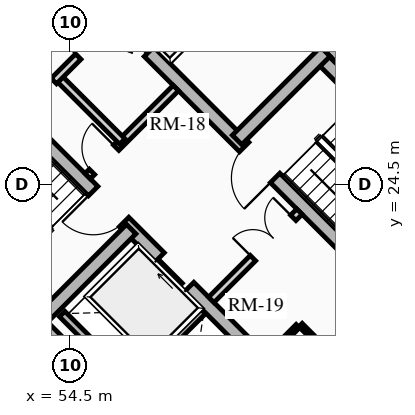
"""IFC4 building model, lengths in metres.
Left out: names, types, materials, properties, quantities, classifications, styles, units other than length and angle.
Written with IfcOpenShell. Run it as: python <this file> out.ifc"""

import sys

from ifc_helpers import new_model, si_unit, direction, frame, frame_2d, origin, place, context, subcontext, project, spatial, rectangle, extrude, source, transform, mapped, element, fill, save


model = new_model("IFC4")
c1 = context("Model", 3, precision=1e-05, world=origin(), true_north=direction((0.0, 1.0)))
c2 = subcontext(c1, "Body", "Model", "MODEL_VIEW")
j1 = project(units=[si_unit("LENGTHUNIT", "METRE"), si_unit("PLANEANGLEUNIT", "RADIAN")], contexts=[c1])
p1 = place(None, origin())
s1 = spatial("IfcSite", under=j1, at=p1, CompositionType="ELEMENT")
p2 = place(p1, origin())
s2 = spatial("IfcBuilding", under=s1, at=p2, CompositionType="ELEMENT")
p3 = place(p2, frame((0.0, 0.0, 24.91)))
s3 = spatial("IfcBuildingStorey", under=s2, at=p3, CompositionType="ELEMENT", Elevation=24.91)
for number, where, z_axis, x_axis in (
    (1, (58.773, 15.661, 0.0), (0.0, 0.0, 1.0), (-0.707, 0.707, 0.0)),
    (2, (66.339, 23.227, 0.0), (0.0, 0.0, 1.0), (-0.707, 0.707, 0.0)),
):
    element("IfcWall", number, at=place(p3, frame(where, z_axis=z_axis, x_axis=x_axis)), inside=s3, PredefinedType="SHEAR", context=c2, shape_type="SweptSolid", body=[
        extrude(rectangle(XDim=14.3, YDim=0.5, at=frame_2d((7.15, 0.0))), origin(), (0.0, 0.0, 1.0), 2.91),
    ])
p4 = place(p3, frame((58.596, 15.838, 0.0), z_axis=(0.0, 0.0, 1.0), x_axis=(0.707106781187, 0.707106781187, 0.0)))
e3 = element("IfcWall", 3, at=p4, inside=s3, PredefinedType="SHEAR", context=c2, shape_type="SweptSolid", body=[
    extrude(rectangle(XDim=10.7, YDim=0.5, at=frame_2d((5.35, 0.0))), origin(), (0.0, 0.0, 1.0), 2.91),
])
m1 = source(origin(), c2, "Body", "SweptSolid", [
    extrude(rectangle(XDim=1.5, YDim=2.02, at=frame_2d((0.75, 1.01))), frame((0.0, 0.26, 0.0), z_axis=(0.0, -1.0, 0.0), x_axis=(1.0, 0.0, 0.0)), (0.0, 0.0, 1.0), 0.52),
])
p5 = place(p4, frame((5.45, 0.0, 0.0)))
e4 = element("IfcOpeningElement", 4, at=p5, cuts=e3, PredefinedType="OPENING", context=c2, shape_type="MappedRepresentation", body=[
    mapped(m1, transform((0.0, 0.0, 0.0), x_axis=(1.0, 0.0, 0.0), y_axis=(0.0, 1.0, 0.0), z_axis=(0.0, 0.0, 1.0), scale=1.0)),
])
p6 = place(p3, frame((48.838, 25.596, 0.0), z_axis=(0.0, 0.0, 1.0), x_axis=(0.707106781187, 0.707106781187, 0.0)))
e5 = element("IfcWall", 5, at=p6, inside=s3, PredefinedType="SHEAR", context=c2, shape_type="SweptSolid", body=[
    extrude(rectangle(XDim=10.7, YDim=0.5, at=frame_2d((5.35, 0.0))), origin(), (0.0, 0.0, 1.0), 2.91),
])
p7 = place(p6, frame((4.6, 0.0, 0.0)))
e6 = element("IfcOpeningElement", 6, at=p7, cuts=e5, PredefinedType="OPENING", context=c2, shape_type="MappedRepresentation", body=[
    mapped(m1, transform((0.0, 0.0, 0.0), x_axis=(1.0, 0.0, 0.0), y_axis=(0.0, 1.0, 0.0), z_axis=(0.0, 0.0, 1.0), scale=1.0)),
])
p8 = place(p3, frame((61.096, 18.338, 0.0), z_axis=(0.0, 0.0, 1.0), x_axis=(-0.707106781187, 0.707106781187, 0.0)))
e7 = element("IfcWall", 7, at=p8, inside=s3, PredefinedType="SHEAR", context=c2, shape_type="SweptSolid", body=[
    extrude(rectangle(XDim=13.8, YDim=0.35, at=frame_2d((6.9, 0.0))), origin(), (0.0, 0.0, 1.0), 2.91),
])
m2 = source(origin(), c2, "Body", "SweptSolid", [
    extrude(rectangle(XDim=1.1, YDim=2.015, at=frame_2d((0.55, 1.007))), frame((0.0, 0.185, 0.0), z_axis=(0.0, -1.0, 0.0), x_axis=(1.0, 0.0, 0.0)), (0.0, 0.0, 1.0), 0.37),
])
p9 = place(p8, frame((4.9, 0.0, 0.0)))
e8 = element("IfcOpeningElement", 8, at=p9, cuts=e7, PredefinedType="OPENING", context=c2, shape_type="MappedRepresentation", body=[
    mapped(m2, transform((0.0, 0.0, 0.0), x_axis=(1.0, 0.0, 0.0), y_axis=(0.0, 1.0, 0.0), z_axis=(0.0, 0.0, 1.0), scale=1.0)),
])
m3 = source(origin(), c2, "Body", "SweptSolid", [
    extrude(rectangle(XDim=1.15, YDim=2.02, at=frame_2d((0.575, 1.01))), frame((0.0, 0.185, 0.0), z_axis=(0.0, -1.0, 0.0), x_axis=(1.0, 0.0, 0.0)), (0.0, 0.0, 1.0), 0.37),
])
p10 = place(p8, frame((7.32, 0.0, 0.0)))
e9 = element("IfcOpeningElement", 9, at=p10, cuts=e7, PredefinedType="OPENING", context=c2, shape_type="MappedRepresentation", body=[
    mapped(m3, transform((0.0, 0.0, 0.0), x_axis=(1.0, 0.0, 0.0), y_axis=(0.0, 1.0, 0.0), z_axis=(0.0, 0.0, 1.0), scale=1.0)),
])
p11 = place(p3, frame((63.662, 20.904, 0.0), z_axis=(0.0, 0.0, 1.0), x_axis=(-0.707106781187, 0.707106781187, 0.0)))
e10 = element("IfcWall", 10, at=p11, inside=s3, PredefinedType="SHEAR", context=c2, shape_type="SweptSolid", body=[
    extrude(rectangle(XDim=13.8, YDim=0.35, at=frame_2d((6.9, 0.0))), origin(), (0.0, 0.0, 1.0), 2.91),
])
p12 = place(p11, frame((10.025, 0.0, 0.0)))
e11 = element("IfcOpeningElement", 11, at=p12, cuts=e10, PredefinedType="OPENING", context=c2, shape_type="MappedRepresentation", body=[
    mapped(m2, transform((0.0, 0.0, 0.0), x_axis=(1.0, 0.0, 0.0), y_axis=(0.0, 1.0, 0.0), z_axis=(0.0, 0.0, 1.0), scale=1.0)),
])
p13 = place(p11, frame((12.025, 0.0, 0.0)))
e12 = element("IfcOpeningElement", 12, at=p13, cuts=e10, PredefinedType="OPENING", context=c2, shape_type="MappedRepresentation", body=[
    mapped(m2, transform((0.0, 0.0, 0.0), x_axis=(1.0, 0.0, 0.0), y_axis=(0.0, 1.0, 0.0), z_axis=(0.0, 0.0, 1.0), scale=1.0)),
])
p14 = place(p11, frame((5.33, 0.0, 0.0)))
e13 = element("IfcOpeningElement", 13, at=p14, cuts=e10, PredefinedType="OPENING", context=c2, shape_type="MappedRepresentation", body=[
    mapped(m3, transform((0.0, 0.0, 0.0), x_axis=(1.0, 0.0, 0.0), y_axis=(0.0, 1.0, 0.0), z_axis=(0.0, 0.0, 1.0), scale=1.0)),
])
p15 = place(p3, frame((53.922, 21.141, 0.0), z_axis=(0.0, 0.0, 1.0), x_axis=(-0.707106781187, 0.707106781187, 0.0)))
e14 = element("IfcWall", 14, at=p15, inside=s3, PredefinedType="SHEAR", context=c2, shape_type="SweptSolid", body=[
    extrude(rectangle(XDim=6.745, YDim=0.35, at=frame_2d((3.373, 0.0))), origin(), (0.0, 0.0, 1.0), 2.91),
])
p16 = place(p3, frame((53.784, 21.003, 0.0), z_axis=(0.0, 0.0, 1.0), x_axis=(0.707106781187, 0.707106781187, 0.0)))
e15 = element("IfcWall", 15, at=p16, inside=s3, PredefinedType="SHEAR", context=c2, shape_type="SweptSolid", body=[
    extrude(rectangle(XDim=3.285, YDim=0.35, at=frame_2d((1.643, 0.0))), origin(), (0.0, 0.0, 1.0), 2.91),
])
p17 = place(p3, frame((65.847, 23.089, 0.0), z_axis=(0.0, 0.0, 1.0), x_axis=(-0.707106781187, 0.707106781187, 0.0)))
e16 = element("IfcWall", 16, at=p17, inside=s3, PredefinedType="SHEAR", context=c2, shape_type="SweptSolid", body=[
    extrude(rectangle(XDim=6.745, YDim=0.35, at=frame_2d((3.373, 0.0))), origin(), (0.0, 0.0, 1.0), 2.91),
])
p18 = place(p3, frame((58.893, 25.674, 0.0), z_axis=(0.0, 0.0, 1.0), x_axis=(0.707106781187, 0.707106781187, 0.0)))
e17 = element("IfcWall", 17, at=p18, inside=s3, PredefinedType="SHEAR", context=c2, shape_type="SweptSolid", body=[
    extrude(rectangle(XDim=3.285, YDim=0.35, at=frame_2d((1.643, 0.0))), origin(), (0.0, 0.0, 1.0), 2.91),
])
p19 = place(p3, frame((55.888, 19.069, 0.0), z_axis=(0.0, 0.0, 1.0), x_axis=(0.707106781187, 0.707106781187, 0.0)))
e18 = element("IfcWall", 18, at=p19, inside=s3, PredefinedType="SHEAR", context=c2, shape_type="SweptSolid", body=[
    extrude(rectangle(XDim=2.97, YDim=0.2, at=frame_2d((1.485, 0.0))), origin(), (0.0, 0.0, 1.0), 2.91),
])
p20 = place(p3, frame((56.015, 19.366, 0.0), z_axis=(0.0, 0.0, 1.0), x_axis=(-0.707106781187, 0.707106781187, 0.0)))
e19 = element("IfcWall", 19, at=p20, inside=s3, PredefinedType="SHEAR", context=c2, shape_type="SweptSolid", body=[
    extrude(rectangle(XDim=2.44, YDim=0.2, at=frame_2d((1.22, 0.0))), origin(), (0.0, 0.0, 1.0), 2.91),
])
p21 = place(p3, frame((57.062, 27.781, 0.0), z_axis=(0.0, 0.0, 1.0), x_axis=(0.707106781187, 0.707106781187, 0.0)))
e20 = element("IfcWall", 20, at=p21, inside=s3, PredefinedType="SHEAR", context=c2, shape_type="SweptSolid", body=[
    extrude(rectangle(XDim=2.97, YDim=0.2, at=frame_2d((1.485, 0.0))), origin(), (0.0, 0.0, 1.0), 2.91),
])
p22 = place(p3, frame((58.214, 21.467, 0.0), z_axis=(0.0, 0.0, 1.0), x_axis=(0.707106781187, 0.707106781187, 0.0)))
e21 = element("IfcWall", 21, at=p22, inside=s3, PredefinedType="PARTITIONING", context=c2, shape_type="SweptSolid", body=[
    extrude(rectangle(XDim=3.28, YDim=0.2, at=frame_2d((1.64, 0.0))), origin(), (0.0, 0.0, 1.0), 2.635),
])
m4 = source(origin(), c2, "Body", "SweptSolid", [
    extrude(rectangle(XDim=1.5, YDim=2.02, at=frame_2d((0.75, 1.01))), frame((0.0, 0.11, 0.0), z_axis=(0.0, -1.0, 0.0), x_axis=(1.0, 0.0, 0.0)), (0.0, 0.0, 1.0), 0.22),
])
p23 = place(p22, frame((1.55, 0.0, 0.0)))
e22 = element("IfcOpeningElement", 22, at=p23, cuts=e21, PredefinedType="OPENING", context=c2, shape_type="MappedRepresentation", body=[
    mapped(m4, transform((0.0, 0.0, 0.0), x_axis=(1.0, 0.0, 0.0), y_axis=(0.0, 1.0, 0.0), z_axis=(0.0, 0.0, 1.0), scale=1.0)),
])
p24 = place(p3, frame((54.961, 24.719, 0.0), z_axis=(0.0, 0.0, 1.0), x_axis=(0.707106781187, 0.707106781187, 0.0)))
e23 = element("IfcWall", 23, at=p24, inside=s3, PredefinedType="PARTITIONING", context=c2, shape_type="SweptSolid", body=[
    extrude(rectangle(XDim=3.28, YDim=0.2, at=frame_2d((1.64, 0.0))), origin(), (0.0, 0.0, 1.0), 2.635),
])
m5 = source(origin(), c2, "Body", "SweptSolid", [
    extrude(rectangle(XDim=0.9, YDim=2.005, at=frame_2d((0.45, 1.002))), frame((0.0, 0.11, 0.0), z_axis=(0.0, -1.0, 0.0), x_axis=(1.0, 0.0, 0.0)), (0.0, 0.0, 1.0), 0.22),
])
p25 = place(p24, frame((0.16, 0.0, 0.0)))
e24 = element("IfcOpeningElement", 24, at=p25, cuts=e23, PredefinedType="OPENING", context=c2, shape_type="MappedRepresentation", body=[
    mapped(m5, transform((0.0, 0.0, 0.0), x_axis=(1.0, 0.0, 0.0), y_axis=(0.0, 1.0, 0.0), z_axis=(0.0, 0.0, 1.0), scale=1.0)),
])
p26 = place(p3, frame((55.874, 25.631, 0.0), z_axis=(0.0, 0.0, 1.0), x_axis=(-0.707157639372, 0.707055919343, 0.0)))
e25 = element("IfcWall", 25, at=p26, inside=s3, PredefinedType="PARTITIONING", context=c2, shape_type="SweptSolid", body=[
    extrude(rectangle(XDim=2.4, YDim=0.2, at=frame_2d((1.2, 0.0))), origin(), (0.0, 0.0, 1.0), 2.635),
])
p27 = place(p3, frame((53.264, 26.416, 0.0), z_axis=(0.0, 0.0, 1.0), x_axis=(0.707106781187, 0.707106781187, 0.0)))
e26 = element("IfcWall", 26, at=p27, inside=s3, PredefinedType="PARTITIONING", context=c2, shape_type="SweptSolid", body=[
    extrude(rectangle(XDim=3.28, YDim=0.2, at=frame_2d((1.64, 0.0))), origin(), (0.0, 0.0, 1.0), 2.635),
])
m6 = source(origin(), c2, "Body", "SweptSolid", [
    extrude(rectangle(XDim=1.0, YDim=2.015, at=frame_2d((0.5, 1.007))), frame((0.0, 0.11, 0.0), z_axis=(0.0, -1.0, 0.0), x_axis=(1.0, 0.0, 0.0)), (0.0, 0.0, 1.0), 0.22),
])
p28 = place(p27, frame((0.14, 0.0, 0.0)))
e27 = element("IfcOpeningElement", 27, at=p28, cuts=e26, PredefinedType="OPENING", context=c2, shape_type="MappedRepresentation", body=[
    mapped(m6, transform((0.0, 0.0, 0.0), x_axis=(1.0, 0.0, 0.0), y_axis=(0.0, 1.0, 0.0), z_axis=(0.0, 0.0, 1.0), scale=1.0)),
])
p29 = place(p27, frame((2.05, 0.0, 0.0)))
e28 = element("IfcOpeningElement", 28, at=p29, cuts=e26, PredefinedType="OPENING", context=c2, shape_type="MappedRepresentation", body=[
    mapped(m5, transform((0.0, 0.0, 0.0), x_axis=(1.0, 0.0, 0.0), y_axis=(0.0, 1.0, 0.0), z_axis=(0.0, 0.0, 1.0), scale=1.0)),
])
p30 = place(p3, frame((61.835, 19.529, 0.0), z_axis=(0.0, 0.0, 1.0), x_axis=(-0.707174592913, 0.707038962956, 0.0)))
e29 = element("IfcWall", 29, at=p30, inside=s3, PredefinedType="PARTITIONING", context=c2, shape_type="SweptSolid", body=[
    extrude(rectangle(XDim=1.8, YDim=0.125, at=frame_2d((0.9, 0.0))), origin(), (0.0, 0.0, 1.0), 2.635),
])
m7 = source(origin(), c2, "Body", "SweptSolid", [
    extrude(rectangle(XDim=0.9, YDim=2.005, at=frame_2d((0.45, 1.002))), frame((0.0, 0.073, 0.0), z_axis=(0.0, -1.0, 0.0), x_axis=(1.0, 0.0, 0.0)), (0.0, 0.0, 1.0), 0.145),
])
p31 = place(p30, frame((0.42, 0.0, 0.0)))
e30 = element("IfcOpeningElement", 30, at=p31, cuts=e29, PredefinedType="OPENING", context=c2, shape_type="MappedRepresentation", body=[
    mapped(m7, transform((0.0, 0.0, 0.0), x_axis=(1.0, 0.0, 0.0), y_axis=(0.0, 1.0, 0.0), z_axis=(0.0, 0.0, 1.0), scale=1.0)),
])
p32 = place(p3, frame((59.713, 19.996, 0.0), z_axis=(0.0, 0.0, 1.0), x_axis=(0.707217726, 0.706995818963, 0.0)))
e31 = element("IfcWall", 31, at=p32, inside=s3, PredefinedType="PARTITIONING", context=c2, shape_type="SweptSolid", body=[
    extrude(rectangle(XDim=1.1, YDim=0.125, at=frame_2d((0.55, 0.0))), origin(), (0.0, 0.0, 1.0), 2.635),
])
m8 = source(origin(), c2, "Body", "SweptSolid", [
    extrude(rectangle(XDim=1.1, YDim=2.015, at=frame_2d((0.55, 1.007))), frame((0.0, 0.025, 0.0), z_axis=(0.0, -1.0, 0.0), x_axis=(1.0, 0.0, 0.0)), (0.0, 0.0, 1.0), 0.05),
])
p33 = place(p9, origin())
e32 = element("IfcDoor", 32, at=p33, inside=s3, OperationType="SLIDING_TO_RIGHT", PredefinedType="DOOR", context=c2, shape_type="MappedRepresentation", body=[
    mapped(m8, transform((0.0, 0.0, 0.0), x_axis=(1.0, 0.0, 0.0), y_axis=(0.0, 1.0, 0.0), z_axis=(0.0, 0.0, 1.0), scale=1.0)),
])
fill(e8, e32)
m9 = source(origin(), c2, "Body", "SweptSolid", [
    extrude(rectangle(XDim=1.15, YDim=2.02, at=frame_2d((0.575, 1.01))), frame((0.0, 0.025, 0.0), z_axis=(0.0, -1.0, 0.0), x_axis=(1.0, 0.0, 0.0)), (0.0, 0.0, 1.0), 0.05),
])
p34 = place(p10, origin())
e33 = element("IfcDoor", 33, at=p34, inside=s3, OperationType="SINGLE_SWING_RIGHT", PredefinedType="DOOR", context=c2, shape_type="MappedRepresentation", body=[
    mapped(m9, transform((0.0, 0.0, 0.0), x_axis=(1.0, 0.0, 0.0), y_axis=(0.0, 1.0, 0.0), z_axis=(0.0, 0.0, 1.0), scale=1.0)),
])
fill(e9, e33)
p35 = place(p14, origin())
e34 = element("IfcDoor", 34, at=p35, inside=s3, OperationType="SINGLE_SWING_LEFT", PredefinedType="DOOR", context=c2, shape_type="MappedRepresentation", body=[
    mapped(m9, transform((0.0, 0.0, 0.0), x_axis=(1.0, 0.0, 0.0), y_axis=(0.0, 1.0, 0.0), z_axis=(0.0, 0.0, 1.0), scale=1.0)),
])
fill(e13, e34)
m10 = source(origin(), c2, "Body", "SweptSolid", [
    extrude(rectangle(XDim=1.5, YDim=2.02, at=frame_2d((0.75, 1.01))), frame((0.0, 0.025, 0.0), z_axis=(0.0, -1.0, 0.0), x_axis=(1.0, 0.0, 0.0)), (0.0, 0.0, 1.0), 0.05),
])
p36 = place(p23, origin())
e35 = element("IfcDoor", 35, at=p36, inside=s3, OperationType="DOUBLE_DOOR_SINGLE_SWING", PredefinedType="DOOR", context=c2, shape_type="MappedRepresentation", body=[
    mapped(m10, transform((0.0, 0.0, 0.0), x_axis=(1.0, 0.0, 0.0), y_axis=(0.0, 1.0, 0.0), z_axis=(0.0, 0.0, 1.0), scale=1.0)),
])
fill(e22, e35)
m11 = source(origin(), c2, "Body", "SweptSolid", [
    extrude(rectangle(XDim=0.9, YDim=2.005, at=frame_2d((0.45, 1.002))), frame((0.0, 0.025, 0.0), z_axis=(0.0, -1.0, 0.0), x_axis=(1.0, 0.0, 0.0)), (0.0, 0.0, 1.0), 0.05),
])
p37 = place(p25, origin())
e36 = element("IfcDoor", 36, at=p37, inside=s3, OperationType="SINGLE_SWING_RIGHT", PredefinedType="DOOR", context=c2, shape_type="MappedRepresentation", body=[
    mapped(m11, transform((0.0, 0.0, 0.0), x_axis=(1.0, 0.0, 0.0), y_axis=(0.0, 1.0, 0.0), z_axis=(0.0, 0.0, 1.0), scale=1.0)),
])
fill(e24, e36)
m12 = source(origin(), c2, "Body", "SweptSolid", [
    extrude(rectangle(XDim=1.0, YDim=2.015, at=frame_2d((0.5, 1.007))), frame((0.0, 0.025, 0.0), z_axis=(0.0, -1.0, 0.0), x_axis=(1.0, 0.0, 0.0)), (0.0, 0.0, 1.0), 0.05),
])
p38 = place(p28, origin())
e37 = element("IfcDoor", 37, at=p38, inside=s3, OperationType="SINGLE_SWING_LEFT", PredefinedType="DOOR", context=c2, shape_type="MappedRepresentation", body=[
    mapped(m12, transform((0.0, 0.0, 0.0), x_axis=(1.0, 0.0, 0.0), y_axis=(0.0, 1.0, 0.0), z_axis=(0.0, 0.0, 1.0), scale=1.0)),
])
fill(e27, e37)
p39 = place(p29, origin())
e38 = element("IfcDoor", 38, at=p39, inside=s3, OperationType="SINGLE_SWING_LEFT", PredefinedType="DOOR", context=c2, shape_type="MappedRepresentation", body=[
    mapped(m11, transform((0.0, 0.0, 0.0), x_axis=(1.0, 0.0, 0.0), y_axis=(0.0, 1.0, 0.0), z_axis=(0.0, 0.0, 1.0), scale=1.0)),
])
fill(e28, e38)
save(model, sys.argv[1])
